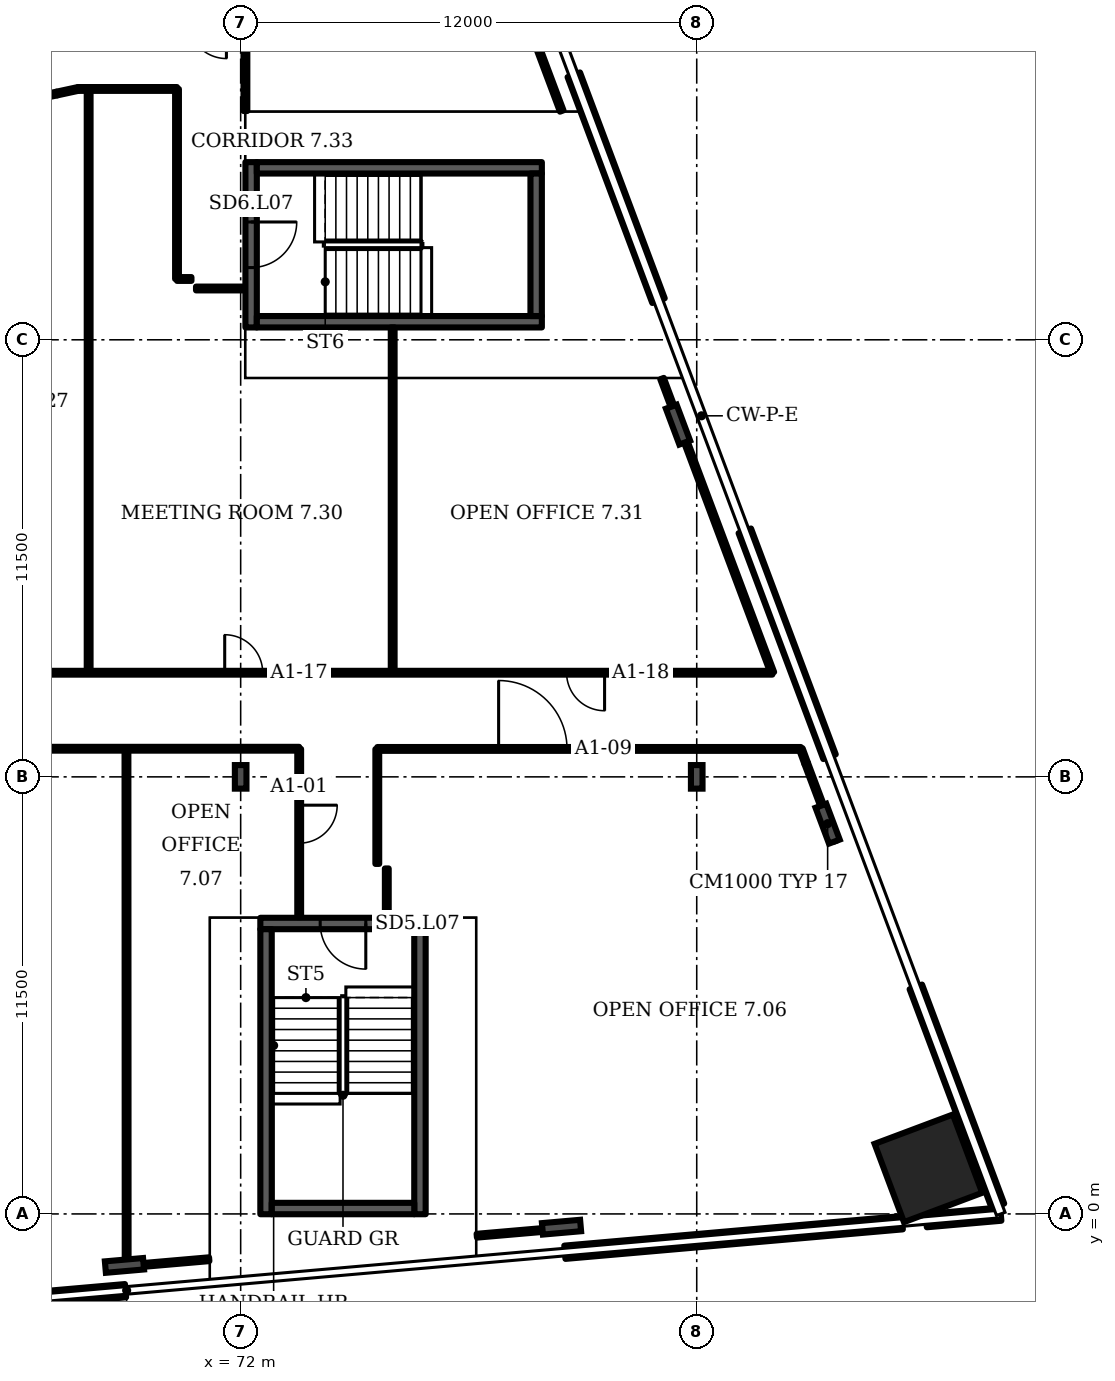
"""IFC4 building model, lengths in metres.
Left out: names, types, materials, properties, quantities, classifications, styles, units other than length and angle.
Written with IfcOpenShell. Run it as: python <this file> out.ifc"""

import sys

from ifc_helpers import new_model, si_unit, direction, frame, frame_2d, origin, origin_2d, place, context, subcontext, project, spatial, rectangle, i_section, extrude, element, fill, save


model = new_model("IFC4")
c1 = context("Model", 3, precision=1e-05, world=origin(), true_north=direction((0.0, 1.0)))
c2 = subcontext(c1, "Body", "Model", "MODEL_VIEW")
j1 = project(units=[si_unit("LENGTHUNIT", "METRE"), si_unit("PLANEANGLEUNIT", "RADIAN")], contexts=[c1])
p1 = place(None, origin())
s1 = spatial("IfcSite", under=j1, at=p1, CompositionType="ELEMENT")
p2 = place(p1, origin())
s2 = spatial("IfcBuilding", under=s1, at=p2, CompositionType="ELEMENT")
p3 = place(p2, frame((0.0, 0.0, 45.1)))
s3 = spatial("IfcBuildingStorey", under=s2, at=p3, CompositionType="ELEMENT", Elevation=45.1)
p4 = place(p3, frame((90.096, 1.2, 0.0), z_axis=(0.0, 0.0, 1.0), x_axis=(-0.351123, 0.936328, 0.0)))
e1 = element("IfcColumn", 1, at=p4, inside=s3, PredefinedType="COLUMN", context=c2, shape_type="SweptSolid", body=[
    extrude(rectangle(XDim=2.2, YDim=2.2, at=origin_2d()), origin(), (0.0, 0.0, 1.0), 3.6),
])
for number, where, z_axis, x_axis in (
    (2, (68.942, -1.355, 0.0), (0.0, 0.0, 1.0), (0.087, -0.996, 0.0)),
    (3, (80.442, -0.349, 0.0), (0.0, 0.0, 1.0), (0.087, -0.996, 0.0)),
    (4, (87.445, 10.268, 0.0), (0.0, 0.0, 1.0), (0.936, 0.351, 0.0)),
    (5, (83.507, 20.768, 0.0), (0.0, 0.0, 1.0), (0.936, 0.351, 0.0)),
):
    element("IfcColumn", number, at=place(p3, frame(where, z_axis=z_axis, x_axis=x_axis)), inside=s3, PredefinedType="COLUMN", context=c2, shape_type="SweptSolid", body=[
        extrude(i_section(OverallWidth=0.302, OverallDepth=1.008, WebThickness=0.021, FlangeThickness=0.04, FilletRadius=0.03, at=origin_2d()), origin(), (0.0, 0.0, 1.0), 3.6),
    ])
for number, where, z_axis, x_axis in (
    (6, (72.0, 11.5, 0.0), (0.0, 0.0, 1.0), (1.0, 0.0, 0.0)),
    (7, (84.0, 11.5, 0.0), (0.0, 0.0, 1.0), (1.0, 0.0, 0.0)),
):
    element("IfcColumn", number, at=place(p3, frame(where, z_axis=z_axis, x_axis=x_axis)), inside=s3, PredefinedType="COLUMN", context=c2, shape_type="SweptSolid", body=[
        extrude(i_section(OverallWidth=0.305, OverallDepth=0.62, WebThickness=0.021, FlangeThickness=0.04, FilletRadius=0.027, at=origin_2d()), origin(), (0.0, 0.0, 1.0), 3.6),
    ])
p5 = place(p3, frame((46.045, -4.026, 0.0), z_axis=(0.0, 0.0, 1.0), x_axis=(0.99619, 0.087163, 0.0)))
e8 = element("IfcWall", 8, at=p5, inside=s3, PredefinedType="SOLIDWALL", context=c2, shape_type="SweptSolid", body=[
    extrude(rectangle(XDim=23.013, YDim=0.35, at=frame_2d((11.506, 0.0))), origin(), (0.0, 0.0, 1.0), 1.0),
])
p6 = place(p3, frame((80.53, -1.009, 0.0), z_axis=(0.0, 0.0, 1.0), x_axis=(0.996198, 0.087169, 0.0)))
e9 = element("IfcWall", 9, at=p6, inside=s3, PredefinedType="SOLIDWALL", context=c2, shape_type="SweptSolid", body=[
    extrude(rectangle(XDim=8.912, YDim=0.35, at=frame_2d((4.456, 0.0))), origin(), (0.0, 0.0, 1.0), 1.0),
])
p7 = place(p3, frame((90.039, -0.177, 0.0), z_axis=(0.0, 0.0, 1.0), x_axis=(0.996193, 0.08717, 0.0)))
e10 = element("IfcWall", 10, at=p7, inside=s3, PredefinedType="SOLIDWALL", context=c2, shape_type="SweptSolid", body=[
    extrude(rectangle(XDim=1.969, YDim=0.35, at=frame_2d((0.984, 0.0))), origin(), (0.0, 0.0, 1.0), 1.0),
])
p8 = place(p3, frame((91.926, 0.211, 0.0), z_axis=(0.0, 0.0, 1.0), x_axis=(-0.351118, 0.936328, 0.0)))
e11 = element("IfcWall", 11, at=p8, inside=s3, PredefinedType="SOLIDWALL", context=c2, shape_type="SweptSolid", body=[
    extrude(rectangle(XDim=6.154, YDim=0.35, at=frame_2d((3.077, 0.0))), origin(), (0.0, 0.0, 1.0), 1.0),
])
for number, where, z_axis, x_axis in (
    (12, (87.494, 12.03, 0.0), (0.0, 0.0, 1.0), (-0.351, 0.936, 0.0)),
    (13, (82.994, 24.03, 0.0), (0.0, 0.0, 1.0), (-0.351, 0.936, 0.0)),
):
    element("IfcWall", number, at=place(p3, frame(where, z_axis=z_axis, x_axis=x_axis)), inside=s3, PredefinedType="SOLIDWALL", context=c2, shape_type="SweptSolid", body=[
        extrude(rectangle(XDim=6.348, YDim=0.35, at=frame_2d((3.174, 0.0))), origin(), (0.0, 0.0, 1.0), 1.0),
    ])
p9 = place(p3, frame((72.518, 7.642, 0.0), z_axis=(0.0, 0.0, 1.0), x_axis=(1.0, 0.0, 0.0)))
e14 = element("IfcWall", 14, at=p9, inside=s3, PredefinedType="SHEAR", context=c2, shape_type="SweptSolid", body=[
    extrude(rectangle(XDim=4.35, YDim=0.3, at=frame_2d((2.175, 0.0))), origin(), (0.0, 0.0, 1.0), 3.2),
])
p10 = place(p9, frame((1.575, 0.0, 0.0)))
e15 = element("IfcOpeningElement", 15, at=p10, cuts=e14, PredefinedType="OPENING", context=c2, shape_type="SweptSolid", body=[
    extrude(rectangle(XDim=1.2, YDim=2.1, at=frame_2d((0.6, 1.05))), frame((0.0, 0.16, 0.0), z_axis=(0.0, -1.0, 0.0), x_axis=(1.0, 0.0, 0.0)), (0.0, 0.0, 1.0), 0.32),
])
p11 = place(p3, frame((72.275, 23.325, 0.0), z_axis=(0.0, 0.0, 1.0), x_axis=(0.0, 1.0, 0.0)))
e16 = element("IfcWall", 16, at=p11, inside=s3, PredefinedType="SHEAR", context=c2, shape_type="SweptSolid", body=[
    extrude(rectangle(XDim=4.35, YDim=0.3, at=frame_2d((2.175, 0.0))), origin(), (0.0, 0.0, 1.0), 3.2),
])
p12 = place(p11, frame((1.575, 0.0, 0.0)))
e17 = element("IfcOpeningElement", 17, at=p12, cuts=e16, PredefinedType="OPENING", context=c2, shape_type="SweptSolid", body=[
    extrude(rectangle(XDim=1.2, YDim=2.1, at=frame_2d((0.6, 1.05))), frame((0.0, 0.16, 0.0), z_axis=(0.0, -1.0, 0.0), x_axis=(1.0, 0.0, 0.0)), (0.0, 0.0, 1.0), 0.32),
])
p13 = place(p3, frame((40.285, 12.24, 0.0), z_axis=(0.0, 0.0, 1.0), x_axis=(1.0, 0.0, 0.0)))
e18 = element("IfcWall", 18, at=p13, inside=s3, PredefinedType="PARTITIONING", context=c2, shape_type="SweptSolid", body=[
    extrude(rectangle(XDim=33.255, YDim=0.1, at=frame_2d((16.627, 0.0))), origin(), (0.0, 0.0, 1.0), 3.2),
])
p14 = place(p13, frame((10.235, 0.0, 0.0)))
e19 = element("IfcOpeningElement", 19, at=p14, cuts=e18, PredefinedType="OPENING", context=c2, shape_type="SweptSolid", body=[
    extrude(rectangle(XDim=1.8, YDim=2.1, at=frame_2d((0.9, 1.05))), frame((0.0, 0.06, 0.0), z_axis=(0.0, -1.0, 0.0), x_axis=(1.0, 0.0, 0.0)), (0.0, 0.0, 1.0), 0.12),
])
p15 = place(p3, frame((62.98, 14.24, 0.0), z_axis=(0.0, 0.0, 1.0), x_axis=(1.0, 0.0, 0.0)))
e20 = element("IfcWall", 20, at=p15, inside=s3, PredefinedType="PARTITIONING", context=c2, shape_type="SweptSolid", body=[
    extrude(rectangle(XDim=23.01, YDim=0.1, at=frame_2d((11.505, 0.0))), origin(), (0.0, 0.0, 1.0), 3.2),
])
p16 = place(p15, frame((8.6, 0.0, 0.0)))
e21 = element("IfcOpeningElement", 21, at=p16, cuts=e20, PredefinedType="OPENING", context=c2, shape_type="SweptSolid", body=[
    extrude(rectangle(XDim=1.0, YDim=2.1, at=frame_2d((0.5, 1.05))), frame((0.0, 0.06, 0.0), z_axis=(0.0, -1.0, 0.0), x_axis=(1.0, 0.0, 0.0)), (0.0, 0.0, 1.0), 0.12),
])
p17 = place(p15, frame((17.595, 0.0, 0.0)))
e22 = element("IfcOpeningElement", 22, at=p17, cuts=e20, PredefinedType="OPENING", context=c2, shape_type="SweptSolid", body=[
    extrude(rectangle(XDim=1.0, YDim=2.1, at=frame_2d((0.5, 1.05))), frame((0.0, 0.06, 0.0), z_axis=(0.0, -1.0, 0.0), x_axis=(1.0, 0.0, 0.0)), (0.0, 0.0, 1.0), 0.12),
])
p18 = place(p3, frame((66.78, 29.4, 0.0), z_axis=(0.0, 0.0, 1.0), x_axis=(0.979048, 0.203632, 0.0)))
e23 = element("IfcWall", 23, at=p18, inside=s3, PredefinedType="PARTITIONING", context=c2, shape_type="SweptSolid", body=[
    extrude(rectangle(XDim=0.393, YDim=0.1, at=frame_2d((0.197, 0.0))), origin(), (0.0, 0.0, 1.0), 3.2),
])
p19 = place(p3, frame((67.165, 29.48, 0.0), z_axis=(0.0, 0.0, 1.0), x_axis=(0.977367, 0.211555, 0.0)))
e24 = element("IfcWall", 24, at=p19, inside=s3, PredefinedType="PARTITIONING", context=c2, shape_type="SweptSolid", body=[
    extrude(rectangle(XDim=0.568, YDim=0.1, at=frame_2d((0.284, 0.0))), origin(), (0.0, 0.0, 1.0), 3.2),
])
p20 = place(p3, frame((67.72, 29.6, 0.0), z_axis=(0.0, 0.0, 1.0), x_axis=(1.0, 0.0, 0.0)))
e25 = element("IfcWall", 25, at=p20, inside=s3, PredefinedType="PARTITIONING", context=c2, shape_type="SweptSolid", body=[
    extrude(rectangle(XDim=2.605, YDim=0.1, at=frame_2d((1.302, 0.0))), origin(), (0.0, 0.0, 1.0), 3.2),
])
p21 = place(p3, frame((68.0, 14.24, 0.0), z_axis=(0.0, 0.0, 1.0), x_axis=(0.0, 1.0, 0.0)))
e26 = element("IfcWall", 26, at=p21, inside=s3, PredefinedType="PARTITIONING", context=c2, shape_type="SweptSolid", body=[
    extrude(rectangle(XDim=15.36, YDim=0.1, at=frame_2d((7.68, 0.0))), origin(), (0.0, 0.0, 1.0), 3.2),
])
p22 = place(p3, frame((69.0, -1.38, 0.0), z_axis=(0.0, 0.0, 1.0), x_axis=(-0.000359, 1.000002, 0.0)))
e27 = element("IfcWall", 27, at=p22, inside=s3, PredefinedType="PARTITIONING", context=c2, shape_type="SweptSolid", body=[
    extrude(rectangle(XDim=13.615, YDim=0.1, at=frame_2d((6.808, 0.0))), origin(), (0.0, 0.0, 1.0), 3.2),
])
p23 = place(p3, frame((69.0, -1.38, 0.0), z_axis=(0.0, 0.0, 1.0), x_axis=(0.996261, 0.086427, 0.0)))
e28 = element("IfcWall", 28, at=p23, inside=s3, PredefinedType="PARTITIONING", context=c2, shape_type="SweptSolid", body=[
    extrude(rectangle(XDim=2.181, YDim=0.1, at=frame_2d((1.09, 0.0))), origin(), (0.0, 0.0, 1.0), 2.58),
])
p24 = place(p3, frame((70.325, 24.6, 0.0), z_axis=(0.0, 0.0, 1.0), x_axis=(0.0, 1.0, 0.0)))
e29 = element("IfcWall", 29, at=p24, inside=s3, PredefinedType="PARTITIONING", context=c2, shape_type="SweptSolid", body=[
    extrude(rectangle(XDim=5.0, YDim=0.1, at=frame_2d((2.5, 0.0))), origin(), (0.0, 0.0, 1.0), 3.2),
])
p25 = place(p3, frame((70.325, 24.6, 0.0), z_axis=(0.0, 0.0, 1.0), x_axis=(1.0, 0.0, 0.0)))
e30 = element("IfcWall", 30, at=p25, inside=s3, PredefinedType="PARTITIONING", context=c2, shape_type="SweptSolid", body=[
    extrude(rectangle(XDim=0.38, YDim=0.1, at=frame_2d((0.19, 0.0))), origin(), (0.0, 0.0, 1.0), 3.2),
])
p26 = place(p3, frame((70.825, 24.35, 0.0), z_axis=(0.0, 0.0, 1.0), x_axis=(1.0, 0.0, 0.0)))
e31 = element("IfcWall", 31, at=p26, inside=s3, PredefinedType="PARTITIONING", context=c2, shape_type="SweptSolid", body=[
    extrude(rectangle(XDim=1.28, YDim=0.1, at=frame_2d((0.64, 0.0))), origin(), (0.0, 0.0, 1.0), 3.2),
])
p27 = place(p3, frame((72.125, 29.02, 0.0), z_axis=(0.0, 0.0, 1.0), x_axis=(0.0, 1.0, 0.0)))
e32 = element("IfcWall", 32, at=p27, inside=s3, PredefinedType="PARTITIONING", context=c2, shape_type="SweptSolid", body=[
    extrude(rectangle(XDim=2.38, YDim=0.1, at=frame_2d((1.19, 0.0))), origin(), (0.0, 0.0, 1.0), 3.2),
])
p28 = place(p3, frame((73.54, 7.812, 0.0), z_axis=(0.0, 0.0, 1.0), x_axis=(0.0, 1.0, 0.0)))
e33 = element("IfcWall", 33, at=p28, inside=s3, PredefinedType="PARTITIONING", context=c2, shape_type="SweptSolid", body=[
    extrude(rectangle(XDim=4.423, YDim=0.1, at=frame_2d((2.211, 0.0))), origin(), (0.0, 0.0, 1.0), 3.2),
])
p29 = place(p28, frame((1.943, 0.0, 0.0)))
e34 = element("IfcOpeningElement", 34, at=p29, cuts=e33, PredefinedType="OPENING", context=c2, shape_type="SweptSolid", body=[
    extrude(rectangle(XDim=1.0, YDim=2.1, at=frame_2d((0.5, 1.05))), frame((0.0, 0.06, 0.0), z_axis=(0.0, -1.0, 0.0), x_axis=(1.0, 0.0, 0.0)), (0.0, 0.0, 1.0), 0.12),
])
p30 = place(p3, frame((75.595, 9.21, 0.0), z_axis=(0.0, 0.0, 1.0), x_axis=(0.0, 1.0, 0.0)))
e35 = element("IfcWall", 35, at=p30, inside=s3, PredefinedType="PARTITIONING", context=c2, shape_type="SweptSolid", body=[
    extrude(rectangle(XDim=3.02, YDim=0.1, at=frame_2d((1.51, 0.0))), origin(), (0.0, 0.0, 1.0), 3.2),
])
p31 = place(p3, frame((75.595, 12.235, 0.0), z_axis=(0.0, 0.0, 1.0), x_axis=(1.0, 0.0, 0.0)))
e36 = element("IfcWall", 36, at=p31, inside=s3, PredefinedType="PARTITIONING", context=c2, shape_type="SweptSolid", body=[
    extrude(rectangle(XDim=11.145, YDim=0.1, at=frame_2d((5.573, 0.0))), origin(), (0.0, 0.0, 1.0), 3.2),
])
p32 = place(p31, frame((3.192, 0.0, 0.0)))
e37 = element("IfcOpeningElement", 37, at=p32, cuts=e36, PredefinedType="OPENING", context=c2, shape_type="SweptSolid", body=[
    extrude(rectangle(XDim=1.8, YDim=2.1, at=frame_2d((0.9, 1.05))), frame((0.0, 0.06, 0.0), z_axis=(0.0, -1.0, 0.0), x_axis=(1.0, 0.0, 0.0)), (0.0, 0.0, 1.0), 0.12),
])
p33 = place(p3, frame((75.845, 7.812, 0.0), z_axis=(0.0, 0.0, 1.0), x_axis=(0.0, 1.0, 0.0)))
e38 = element("IfcWall", 38, at=p33, inside=s3, PredefinedType="PARTITIONING", context=c2, shape_type="SweptSolid", body=[
    extrude(rectangle(XDim=1.278, YDim=0.1, at=frame_2d((0.639, 0.0))), origin(), (0.0, 0.0, 1.0), 3.2),
])
p34 = place(p3, frame((76.0, 14.24, 0.0), z_axis=(0.0, 0.0, 1.0), x_axis=(0.0, 1.0, 0.0)))
e39 = element("IfcWall", 39, at=p34, inside=s3, PredefinedType="PARTITIONING", context=c2, shape_type="SweptSolid", body=[
    extrude(rectangle(XDim=9.085, YDim=0.1, at=frame_2d((4.542, 0.0))), origin(), (0.0, 0.0, 1.0), 3.2),
])
p35 = place(p3, frame((78.212, -0.573, 0.0), z_axis=(0.0, 0.0, 1.0), x_axis=(0.996271, 0.08623, 0.0)))
e40 = element("IfcWall", 40, at=p35, inside=s3, PredefinedType="PARTITIONING", context=c2, shape_type="SweptSolid", body=[
    extrude(rectangle(XDim=2.296, YDim=0.1, at=frame_2d((1.148, 0.0))), origin(), (0.0, 0.0, 1.0), 2.58),
])
p36 = place(p3, frame((80.448, 29.02, 0.0), z_axis=(0.0, 0.0, 1.0), x_axis=(-0.35129, 0.93627, 0.0)))
e41 = element("IfcWall", 41, at=p36, inside=s3, PredefinedType="PARTITIONING", context=c2, shape_type="SweptSolid", body=[
    extrude(rectangle(XDim=2.911, YDim=0.1, at=frame_2d((1.455, 0.0))), origin(), (0.0, 0.0, 1.0), 2.58),
])
p37 = place(p3, frame((85.99, 14.24, 0.0), z_axis=(0.0, 0.0, 1.0), x_axis=(-0.351133, 0.936325, 0.0)))
e42 = element("IfcWall", 42, at=p37, inside=s3, PredefinedType="PARTITIONING", context=c2, shape_type="SweptSolid", body=[
    extrude(rectangle(XDim=8.266, YDim=0.1, at=frame_2d((4.133, 0.0))), origin(), (0.0, 0.0, 1.0), 2.58),
])
p38 = place(p3, frame((86.88, 11.855, 0.0), z_axis=(0.0, 0.0, 1.0), x_axis=(-0.34537, 0.938466, 0.0)))
e43 = element("IfcWall", 43, at=p38, inside=s3, PredefinedType="PARTITIONING", context=c2, shape_type="SweptSolid", body=[
    extrude(rectangle(XDim=0.405, YDim=0.1, at=frame_2d((0.203, 0.0))), origin(), (0.0, 0.0, 1.0), 2.58),
])
p39 = place(p3, frame((87.65, 9.81, 0.0), z_axis=(0.0, 0.0, 1.0), x_axis=(-0.352397, 0.935852, 0.0)))
e44 = element("IfcWall", 44, at=p39, inside=s3, PredefinedType="PARTITIONING", context=c2, shape_type="SweptSolid", body=[
    extrude(rectangle(XDim=2.185, YDim=0.1, at=frame_2d((1.093, 0.0))), origin(), (0.0, 0.0, 1.0), 2.58),
])
for number, where, z_axis, x_axis in (
    (45, (72.667, -0.008, 0.0), (0.0, 0.0, 1.0), (0.0, 1.0, 0.0)),
    (46, (76.718, -0.008, 0.0), (0.0, 0.0, 1.0), (0.0, 1.0, 0.0)),
):
    element("IfcWall", number, at=place(p3, frame(where, z_axis=z_axis, x_axis=x_axis)), inside=s3, PredefinedType="SHEAR", context=c2, shape_type="SweptSolid", body=[
        extrude(rectangle(XDim=7.5, YDim=0.3, at=frame_2d((3.75, 0.0))), origin(), (0.0, 0.0, 1.0), 3.2),
    ])
p40 = place(p3, frame((72.817, 0.142, 0.0), z_axis=(0.0, 0.0, 1.0), x_axis=(1.0, 0.0, 0.0)))
e47 = element("IfcWall", 47, at=p40, inside=s3, PredefinedType="SHEAR", context=c2, shape_type="SweptSolid", body=[
    extrude(rectangle(XDim=3.75, YDim=0.3, at=frame_2d((1.875, 0.0))), origin(), (0.0, 0.0, 1.0), 3.2),
])
for number, where, z_axis, x_axis in (
    (48, (72.425, 23.475, 0.0), (0.0, 0.0, 1.0), (1.0, 0.0, 0.0)),
    (49, (72.425, 27.525, 0.0), (0.0, 0.0, 1.0), (1.0, 0.0, 0.0)),
):
    element("IfcWall", number, at=place(p3, frame(where, z_axis=z_axis, x_axis=x_axis)), inside=s3, PredefinedType="SHEAR", context=c2, shape_type="SweptSolid", body=[
        extrude(rectangle(XDim=7.5, YDim=0.3, at=frame_2d((3.75, 0.0))), origin(), (0.0, 0.0, 1.0), 3.2),
    ])
p41 = place(p3, frame((79.775, 23.625, 0.0), z_axis=(0.0, 0.0, 1.0), x_axis=(0.0, 1.0, 0.0)))
e50 = element("IfcWall", 50, at=p41, inside=s3, PredefinedType="SHEAR", context=c2, shape_type="SweptSolid", body=[
    extrude(rectangle(XDim=3.75, YDim=0.3, at=frame_2d((1.875, 0.0))), origin(), (0.0, 0.0, 1.0), 3.2),
])
p42 = place(p10, origin())
e51 = element("IfcDoor", 51, at=p42, inside=s3, OperationType="SINGLE_SWING_RIGHT", PredefinedType="DOOR", context=c2, shape_type="SweptSolid", body=[
    extrude(rectangle(XDim=1.2, YDim=2.1, at=frame_2d((0.6, 1.05))), frame((0.0, 0.025, 0.0), z_axis=(0.0, -1.0, 0.0), x_axis=(1.0, 0.0, 0.0)), (0.0, 0.0, 1.0), 0.05),
])
fill(e15, e51)
p43 = place(p12, origin())
e52 = element("IfcDoor", 52, at=p43, inside=s3, OperationType="SINGLE_SWING_RIGHT", PredefinedType="DOOR", context=c2, shape_type="SweptSolid", body=[
    extrude(rectangle(XDim=1.2, YDim=2.1, at=frame_2d((0.6, 1.05))), frame((0.0, 0.025, 0.0), z_axis=(0.0, -1.0, 0.0), x_axis=(1.0, 0.0, 0.0)), (0.0, 0.0, 1.0), 0.05),
])
fill(e17, e52)
p44 = place(p29, origin())
e53 = element("IfcDoor", 53, at=p44, inside=s3, OperationType="SINGLE_SWING_RIGHT", PredefinedType="DOOR", context=c2, shape_type="SweptSolid", body=[
    extrude(rectangle(XDim=1.0, YDim=2.1, at=frame_2d((0.5, 1.05))), frame((0.0, 0.025, 0.0), z_axis=(0.0, -1.0, 0.0), x_axis=(1.0, 0.0, 0.0)), (0.0, 0.0, 1.0), 0.05),
])
fill(e34, e53)
p45 = place(p32, origin())
e54 = element("IfcDoor", 54, at=p45, inside=s3, OperationType="DOUBLE_DOOR_SINGLE_SWING", PredefinedType="DOOR", context=c2, shape_type="SweptSolid", body=[
    extrude(rectangle(XDim=1.8, YDim=2.1, at=frame_2d((0.9, 1.05))), frame((0.0, 0.025, 0.0), z_axis=(0.0, -1.0, 0.0), x_axis=(1.0, 0.0, 0.0)), (0.0, 0.0, 1.0), 0.05),
])
fill(e37, e54)
p46 = place(p16, origin())
e55 = element("IfcDoor", 55, at=p46, inside=s3, OperationType="SINGLE_SWING_LEFT", PredefinedType="DOOR", context=c2, shape_type="SweptSolid", body=[
    extrude(rectangle(XDim=1.0, YDim=2.1, at=frame_2d((0.5, 1.05))), frame((0.0, 0.025, 0.0), z_axis=(0.0, -1.0, 0.0), x_axis=(1.0, 0.0, 0.0)), (0.0, 0.0, 1.0), 0.05),
])
fill(e21, e55)
p47 = place(p17, origin())
e56 = element("IfcDoor", 56, at=p47, inside=s3, OperationType="SINGLE_SWING_RIGHT", PredefinedType="DOOR", context=c2, shape_type="SweptSolid", body=[
    extrude(rectangle(XDim=1.0, YDim=2.1, at=frame_2d((0.5, 1.05))), frame((0.0, 0.025, 0.0), z_axis=(0.0, -1.0, 0.0), x_axis=(1.0, 0.0, 0.0)), (0.0, 0.0, 1.0), 0.05),
])
fill(e22, e56)
save(model, sys.argv[1])
